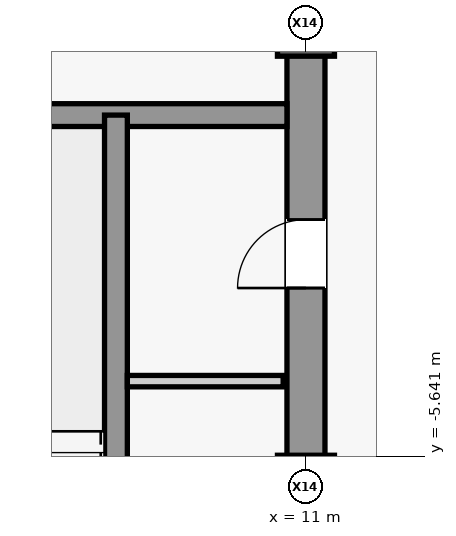
"""IFC4 building model, lengths in metres.
Left out: names, types, materials, properties, quantities, classifications, styles, units other than length and angle.
Written with IfcOpenShell. Run it as: python <this file> out.ifc"""

import sys

from ifc_helpers import new_model, si_unit, direction, frame, frame_2d, origin, origin_2d, place, context, subcontext, project, spatial, rectangle, extrude, source, transform, mapped, element, fill, save


model = new_model("IFC4")
c1 = context("Model", 3, precision=1e-05, world=origin(), true_north=direction((0.0, 1.0)))
c2 = subcontext(c1, "Body", "Model", "MODEL_VIEW")
j1 = project(units=[si_unit("LENGTHUNIT", "METRE"), si_unit("PLANEANGLEUNIT", "RADIAN")], contexts=[c1])
p1 = place(None, origin())
s1 = spatial("IfcSite", under=j1, at=p1, CompositionType="ELEMENT")
p2 = place(p1, origin())
s2 = spatial("IfcBuilding", under=s1, at=p2, CompositionType="ELEMENT")
p3 = place(p2, frame((0.0, 0.0, 394.7)))
s3 = spatial("IfcBuildingStorey", under=s2, at=p3, CompositionType="ELEMENT", Elevation=394.7)
m1 = source(origin(), c2, "Body", "SweptSolid", [
    extrude(rectangle(XDim=22.0, YDim=0.5, at=frame_2d((11.0, 0.0))), origin(), (0.0, 0.0, 1.0), 4.45),
])
p4 = place(p3, frame((11.0, -11.0, 0.0), z_axis=(0.0, 0.0, 1.0), x_axis=(0.0, 1.0, 0.0)))
e1 = element("IfcWall", 1, at=p4, inside=s3, PredefinedType="SHEAR", context=c2, shape_type="MappedRepresentation", body=[
    mapped(m1, transform((0.0, 0.0, 0.0), scale=1.0)),
])
m2 = source(origin(), c2, "Body", "SweptSolid", [
    extrude(rectangle(XDim=1.1, YDim=2.2, at=frame_2d((0.55, 1.1))), frame((0.0, 0.26, 0.0), z_axis=(0.0, -1.0, 0.0), x_axis=(1.0, 0.0, 0.0)), (0.0, 0.0, 1.0), 0.52),
])
p5 = place(p4, frame((0.8, 0.0, 0.0)))
e2 = element("IfcOpeningElement", 2, at=p5, cuts=e1, PredefinedType="OPENING", context=c2, shape_type="MappedRepresentation", body=[
    mapped(m2, transform((0.0, 0.0, 0.0), scale=1.0)),
])
m3 = source(origin(), c2, "Body", "SweptSolid", [
    extrude(rectangle(XDim=0.9, YDim=2.15, at=frame_2d((0.45, 1.075))), frame((0.0, 0.26, 0.0), z_axis=(0.0, -1.0, 0.0), x_axis=(1.0, 0.0, 0.0)), (0.0, 0.0, 1.0), 0.52),
])
p6 = place(p4, frame((7.575, 0.0, 0.0)))
e3 = element("IfcOpeningElement", 3, at=p6, cuts=e1, PredefinedType="OPENING", context=c2, shape_type="MappedRepresentation", body=[
    mapped(m3, transform((0.0, 0.0, 0.0), scale=1.0)),
])
m4 = source(origin(), c2, "Body", "SweptSolid", [
    extrude(rectangle(XDim=1.3, YDim=2.3, at=frame_2d((0.65, 1.15))), frame((0.0, 0.26, 0.0), z_axis=(0.0, -1.0, 0.0), x_axis=(1.0, 0.0, 0.0)), (0.0, 0.0, 1.0), 0.52),
])
p7 = place(p4, frame((2.7, 0.0, 0.0)))
e4 = element("IfcOpeningElement", 4, at=p7, cuts=e1, PredefinedType="OPENING", context=c2, shape_type="MappedRepresentation", body=[
    mapped(m4, transform((0.0, 0.0, 0.0), scale=1.0)),
])
p8 = place(p4, frame((13.35, 0.0, 0.0)))
e5 = element("IfcOpeningElement", 5, at=p8, cuts=e1, PredefinedType="OPENING", context=c2, shape_type="MappedRepresentation", body=[
    mapped(m4, transform((0.0, 0.0, 0.0), scale=1.0)),
])
m5 = source(origin(), c2, "Body", "SweptSolid", [
    extrude(rectangle(XDim=5.65, YDim=0.3, at=frame_2d((2.825, 0.0))), origin(), (0.0, 0.0, 1.0), 4.45),
])
p9 = place(p3, frame((5.1, -1.15, 0.0), z_axis=(0.0, 0.0, 1.0), x_axis=(1.0, 0.0, 0.0)))
e6 = element("IfcWall", 6, at=p9, inside=s3, PredefinedType="SHEAR", context=c2, shape_type="MappedRepresentation", body=[
    mapped(m5, transform((0.0, 0.0, 0.0), scale=1.0)),
])
m6 = source(origin(), c2, "Body", "SweptSolid", [
    extrude(rectangle(XDim=0.75, YDim=0.75, at=origin_2d()), origin(), (0.0, 0.0, 1.0), 4.8),
])
for number, where, z_axis, x_axis in (
    (7, (11.0, -6.0, 0.0), (0.0, 0.0, 1.0), (1.0, 0.0, 0.0)),
    (8, (11.0, 0.0, 0.0), (0.0, 0.0, 1.0), (1.0, 0.0, 0.0)),
):
    element("IfcColumn", number, at=place(p3, frame(where, z_axis=z_axis, x_axis=x_axis)), inside=s3, PredefinedType="COLUMN", context=c2, shape_type="MappedRepresentation", body=[
        mapped(m6, transform((0.0, 0.0, 0.0), scale=1.0)),
    ])
m7 = source(origin(), c2, "Body", "SweptSolid", [
    extrude(rectangle(XDim=7.8, YDim=0.3, at=frame_2d((3.9, 0.0))), origin(), (0.0, 0.0, 1.0), 4.45),
])
p10 = place(p3, frame((8.5, -8.95, 0.0), z_axis=(0.0, 0.0, 1.0), x_axis=(0.0, 1.0, 0.0)))
e9 = element("IfcWall", 9, at=p10, inside=s3, PredefinedType="SHEAR", context=c2, shape_type="MappedRepresentation", body=[
    mapped(m7, transform((0.0, 0.0, 0.0), scale=1.0)),
])
m8 = source(origin(), c2, "Body", "SweptSolid", [
    extrude(rectangle(XDim=2.05, YDim=0.15, at=frame_2d((1.025, 0.0))), origin(), (0.0, 0.0, 1.0), 4.45),
])
p11 = place(p3, frame((8.65, -4.65, 0.0), z_axis=(0.0, 0.0, 1.0), x_axis=(1.0, 0.0, 0.0)))
e10 = element("IfcWall", 10, at=p11, inside=s3, PredefinedType="PARTITIONING", context=c2, shape_type="MappedRepresentation", body=[
    mapped(m8, transform((0.0, 0.0, 0.0), scale=1.0)),
])
m9 = source(origin(), c2, "Body", "SweptSolid", [
    extrude(rectangle(XDim=0.9, YDim=2.15, at=frame_2d((0.45, 1.075))), frame((0.0, 0.025, 0.0), z_axis=(0.0, -1.0, 0.0), x_axis=(1.0, 0.0, 0.0)), (0.0, 0.0, 1.0), 0.05),
])
p12 = place(p6, origin())
e11 = element("IfcDoor", 11, at=p12, inside=s3, OperationType="SINGLE_SWING_LEFT", PredefinedType="DOOR", context=c2, shape_type="MappedRepresentation", body=[
    mapped(m9, transform((0.0, 0.0, 0.0), scale=1.0)),
])
fill(e3, e11)
save(model, sys.argv[1])
